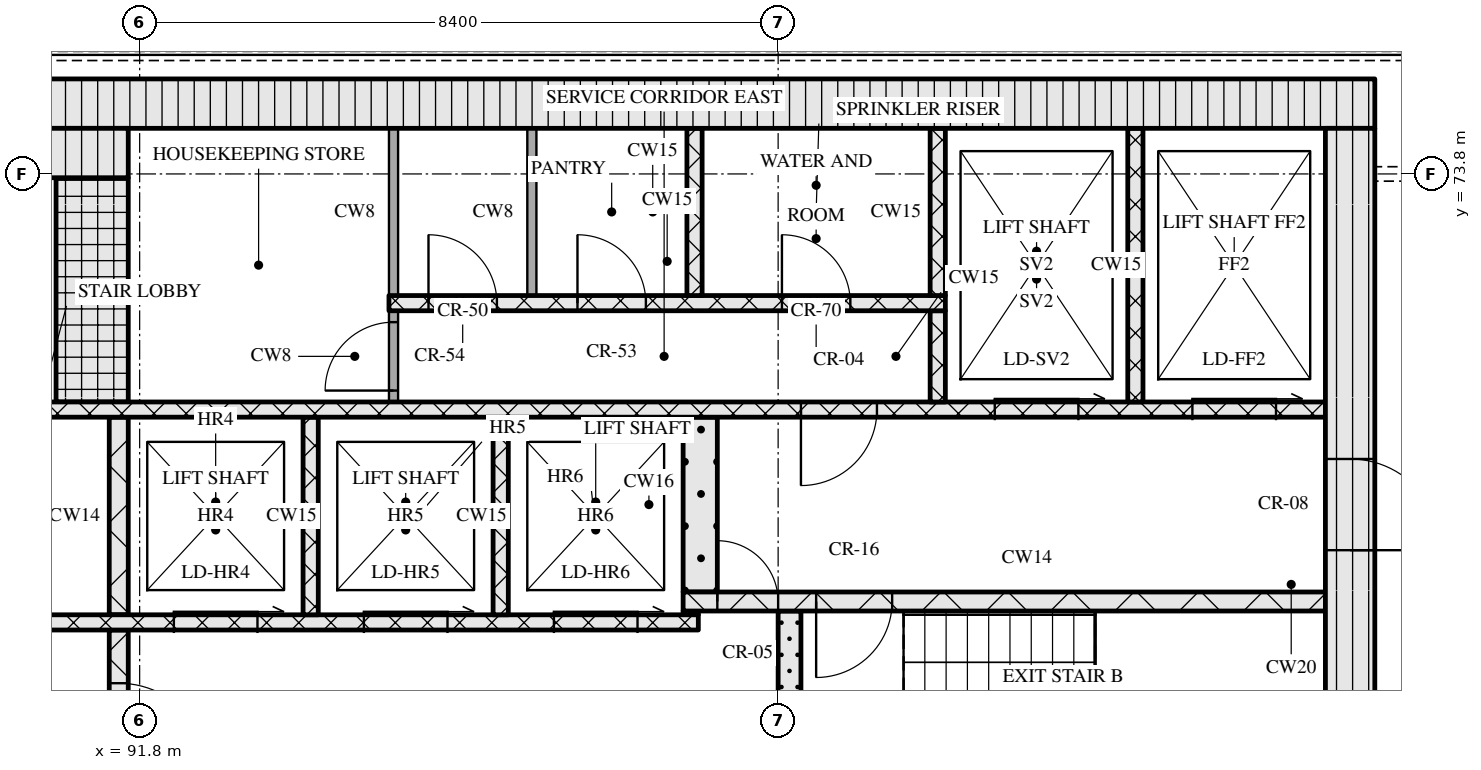
"""IFC4 building model, lengths in metres.
Left out: names, types, materials, properties, quantities, classifications, styles, units other than length and angle.
Written with IfcOpenShell. Run it as: python <this file> out.ifc"""

import sys

from ifc_helpers import new_model, si_unit, direction, frame, frame_2d, origin, place, context, subcontext, project, spatial, rectangle, extrude, element, fill, save


model = new_model("IFC4")
c1 = context("Model", 3, precision=1e-05, world=origin(), true_north=direction((0.0, 1.0)))
c2 = subcontext(c1, "Body", "Model", "MODEL_VIEW")
j1 = project(units=[si_unit("LENGTHUNIT", "METRE"), si_unit("PLANEANGLEUNIT", "RADIAN")], contexts=[c1])
p1 = place(None, origin())
s1 = spatial("IfcSite", under=j1, at=p1, CompositionType="ELEMENT")
p2 = place(p1, origin())
s2 = spatial("IfcBuilding", under=s1, at=p2, CompositionType="ELEMENT")
p3 = place(p2, frame((0.0, 0.0, 234.3)))
s3 = spatial("IfcBuildingStorey", under=s2, at=p3, CompositionType="ELEMENT", Elevation=234.3)
p4 = place(p3, frame((67.15, 74.725, 0.0), z_axis=(0.0, 0.0, 1.0), x_axis=(1.0, 0.0, 0.0)))
e1 = element("IfcWall", 1, at=p4, inside=s3, PredefinedType="SOLIDWALL", context=c2, shape_type="SweptSolid", body=[
    extrude(rectangle(XDim=40.9, YDim=0.65, at=frame_2d((20.45, 0.0))), origin(), (0.0, 0.0, 1.0), 3.32),
])
p5 = place(p3, frame((107.725, 62.4, 0.0), z_axis=(0.0, 0.0, 1.0), x_axis=(0.0, 1.0, 0.0)))
e2 = element("IfcWall", 2, at=p5, inside=s3, PredefinedType="SOLIDWALL", context=c2, shape_type="SweptSolid", body=[
    extrude(rectangle(XDim=12.0, YDim=0.65, at=frame_2d((6.0, 0.0))), origin(), (0.0, 0.0, 1.0), 3.32),
])
p6 = place(p5, frame((6.45, 0.0, 0.0)))
e3 = element("IfcOpeningElement", 3, at=p6, cuts=e2, PredefinedType="OPENING", context=c2, shape_type="SweptSolid", body=[
    extrude(rectangle(XDim=1.2, YDim=2.1, at=frame_2d((0.6, 1.05))), frame((0.0, 0.335, 0.0), z_axis=(0.0, -1.0, 0.0), x_axis=(1.0, 0.0, 0.0)), (0.0, 0.0, 1.0), 0.67),
])
p7 = place(p3, frame((91.525, 65.2, 0.0), z_axis=(0.0, 0.0, 1.0), x_axis=(0.0, 1.0, 0.0)))
e4 = element("IfcWall", 4, at=p7, inside=s3, PredefinedType="SOLIDWALL", context=c2, shape_type="SweptSolid", body=[
    extrude(rectangle(XDim=2.6, YDim=0.25, at=frame_2d((1.3, 0.0))), origin(), (0.0, 0.0, 1.0), 3.32),
])
p8 = place(p7, frame((0.7, 0.0, 0.0)))
e5 = element("IfcOpeningElement", 5, at=p8, cuts=e4, PredefinedType="OPENING", context=c2, shape_type="SweptSolid", body=[
    extrude(rectangle(XDim=1.2, YDim=2.1, at=frame_2d((0.6, 1.05))), frame((0.0, 0.135, 0.0), z_axis=(0.0, -1.0, 0.0), x_axis=(1.0, 0.0, 0.0)), (0.0, 0.0, 1.0), 0.27),
])
p9 = place(p3, frame((100.35, 65.2, 0.0), z_axis=(0.0, 0.0, 1.0), x_axis=(0.0, 1.0, 0.0)))
e6 = element("IfcWall", 6, at=p9, inside=s3, PredefinedType="SOLIDWALL", context=c2, shape_type="SweptSolid", body=[
    extrude(rectangle(XDim=2.85, YDim=0.3, at=frame_2d((1.425, 0.0))), origin(), (0.0, 0.0, 1.0), 3.32),
])
p10 = place(p3, frame((76.05, 67.9, 0.0), z_axis=(0.0, 0.0, 1.0), x_axis=(1.0, 0.0, 0.0)))
e7 = element("IfcWall", 7, at=p10, inside=s3, PredefinedType="SOLIDWALL", context=c2, shape_type="SweptSolid", body=[
    extrude(rectangle(XDim=23.1, YDim=0.2, at=frame_2d((11.55, 0.0))), origin(), (0.0, 0.0, 1.0), 3.32),
])
p11 = place(p10, frame((1.35, 0.0, 0.0)))
e8 = element("IfcOpeningElement", 8, at=p11, cuts=e7, PredefinedType="OPENING", context=c2, shape_type="SweptSolid", body=[
    extrude(rectangle(XDim=0.9, YDim=2.1, at=frame_2d((0.45, 1.05))), frame((0.0, 0.11, 0.0), z_axis=(0.0, -1.0, 0.0), x_axis=(1.0, 0.0, 0.0)), (0.0, 0.0, 1.0), 0.22),
])
p12 = place(p10, frame((5.06, 0.0, 0.0)))
e9 = element("IfcOpeningElement", 9, at=p12, cuts=e7, PredefinedType="OPENING", context=c2, shape_type="SweptSolid", body=[
    extrude(rectangle(XDim=0.9, YDim=2.1, at=frame_2d((0.45, 1.05))), frame((0.0, 0.11, 0.0), z_axis=(0.0, -1.0, 0.0), x_axis=(1.0, 0.0, 0.0)), (0.0, 0.0, 1.0), 0.22),
])
p13 = place(p10, frame((8.45, 0.0, 0.0)))
e10 = element("IfcOpeningElement", 10, at=p13, cuts=e7, PredefinedType="OPENING", context=c2, shape_type="SweptSolid", body=[
    extrude(rectangle(XDim=0.9, YDim=2.1, at=frame_2d((0.45, 1.05))), frame((0.0, 0.11, 0.0), z_axis=(0.0, -1.0, 0.0), x_axis=(1.0, 0.0, 0.0)), (0.0, 0.0, 1.0), 0.22),
])
p14 = place(p10, frame((10.91, 0.0, 0.0)))
e11 = element("IfcOpeningElement", 11, at=p14, cuts=e7, PredefinedType="OPENING", context=c2, shape_type="SweptSolid", body=[
    extrude(rectangle(XDim=0.9, YDim=2.1, at=frame_2d((0.45, 1.05))), frame((0.0, 0.11, 0.0), z_axis=(0.0, -1.0, 0.0), x_axis=(1.0, 0.0, 0.0)), (0.0, 0.0, 1.0), 0.22),
])
p15 = place(p10, frame((13.55, 0.0, 0.0)))
e12 = element("IfcOpeningElement", 12, at=p15, cuts=e7, PredefinedType="OPENING", context=c2, shape_type="SweptSolid", body=[
    extrude(rectangle(XDim=1.0, YDim=2.1, at=frame_2d((0.5, 1.05))), frame((0.0, 0.11, 0.0), z_axis=(0.0, -1.0, 0.0), x_axis=(1.0, 0.0, 0.0)), (0.0, 0.0, 1.0), 0.22),
])
p16 = place(p10, frame((16.2, 0.0, 0.0)))
e13 = element("IfcOpeningElement", 13, at=p16, cuts=e7, PredefinedType="OPENING", context=c2, shape_type="SweptSolid", body=[
    extrude(rectangle(XDim=1.1, YDim=2.1, at=frame_2d((0.55, 1.05))), frame((0.0, 0.11, 0.0), z_axis=(0.0, -1.0, 0.0), x_axis=(1.0, 0.0, 0.0)), (0.0, 0.0, 1.0), 0.22),
])
p17 = place(p10, frame((18.7, 0.0, 0.0)))
e14 = element("IfcOpeningElement", 14, at=p17, cuts=e7, PredefinedType="OPENING", context=c2, shape_type="SweptSolid", body=[
    extrude(rectangle(XDim=1.1, YDim=2.1, at=frame_2d((0.55, 1.05))), frame((0.0, 0.11, 0.0), z_axis=(0.0, -1.0, 0.0), x_axis=(1.0, 0.0, 0.0)), (0.0, 0.0, 1.0), 0.22),
])
p18 = place(p10, frame((21.2, 0.0, 0.0)))
e15 = element("IfcOpeningElement", 15, at=p18, cuts=e7, PredefinedType="OPENING", context=c2, shape_type="SweptSolid", body=[
    extrude(rectangle(XDim=1.1, YDim=2.1, at=frame_2d((0.55, 1.05))), frame((0.0, 0.11, 0.0), z_axis=(0.0, -1.0, 0.0), x_axis=(1.0, 0.0, 0.0)), (0.0, 0.0, 1.0), 0.22),
])
p19 = place(p3, frame((91.525, 68.0, 0.0), z_axis=(0.0, 0.0, 1.0), x_axis=(0.0, 1.0, 0.0)))
e16 = element("IfcWall", 16, at=p19, inside=s3, PredefinedType="SOLIDWALL", context=c2, shape_type="SweptSolid", body=[
    extrude(rectangle(XDim=2.6, YDim=0.25, at=frame_2d((1.3, 0.0))), origin(), (0.0, 0.0, 1.0), 3.32),
])
for number, where, z_axis, x_axis in (
    (17, (94.05, 68.0, 0.0), (0.0, 0.0, 1.0), (0.0, 1.0, 0.0)),
    (18, (96.55, 68.0, 0.0), (0.0, 0.0, 1.0), (0.0, 1.0, 0.0)),
):
    element("IfcWall", number, at=place(p3, frame(where, z_axis=z_axis, x_axis=x_axis)), inside=s3, PredefinedType="SOLIDWALL", context=c2, shape_type="SweptSolid", body=[
        extrude(rectangle(XDim=2.6, YDim=0.2, at=frame_2d((1.3, 0.0))), origin(), (0.0, 0.0, 1.0), 3.32),
    ])
p20 = place(p3, frame((98.95, 68.025, 0.0), z_axis=(0.0, 0.0, 1.0), x_axis=(1.0, 0.0, 0.0)))
e19 = element("IfcWall", 19, at=p20, inside=s3, PredefinedType="SOLIDWALL", context=c2, shape_type="SweptSolid", body=[
    extrude(rectangle(XDim=0.2, YDim=0.05, at=frame_2d((0.1, 0.0))), origin(), (0.0, 0.0, 1.0), 3.32),
])
p21 = place(p3, frame((98.95, 68.175, 0.0), z_axis=(0.0, 0.0, 1.0), x_axis=(1.0, 0.0, 0.0)))
e20 = element("IfcWall", 20, at=p21, inside=s3, PredefinedType="SOLIDWALL", context=c2, shape_type="SweptSolid", body=[
    extrude(rectangle(XDim=8.45, YDim=0.25, at=frame_2d((4.225, 0.0))), origin(), (0.0, 0.0, 1.0), 3.32),
])
p22 = place(p21, frame((0.45, 0.0, 0.0)))
e21 = element("IfcOpeningElement", 21, at=p22, cuts=e20, PredefinedType="OPENING", context=c2, shape_type="SweptSolid", body=[
    extrude(rectangle(XDim=0.8, YDim=2.1, at=frame_2d((0.4, 1.05))), frame((0.0, 0.135, 0.0), z_axis=(0.0, -1.0, 0.0), x_axis=(1.0, 0.0, 0.0)), (0.0, 0.0, 1.0), 0.27),
])
p23 = place(p21, frame((1.75, 0.0, 0.0)))
e22 = element("IfcOpeningElement", 22, at=p23, cuts=e20, PredefinedType="OPENING", context=c2, shape_type="SweptSolid", body=[
    extrude(rectangle(XDim=1.0, YDim=2.1, at=frame_2d((0.5, 1.05))), frame((0.0, 0.135, 0.0), z_axis=(0.0, -1.0, 0.0), x_axis=(1.0, 0.0, 0.0)), (0.0, 0.0, 1.0), 0.27),
])
p24 = place(p3, frame((99.175, 68.3, 0.0), z_axis=(0.0, 0.0, 1.0), x_axis=(0.0, 1.0, 0.0)))
e23 = element("IfcWall", 23, at=p24, inside=s3, PredefinedType="SOLIDWALL", context=c2, shape_type="SweptSolid", body=[
    extrude(rectangle(XDim=2.3, YDim=0.45, at=frame_2d((1.15, 0.0))), origin(), (0.0, 0.0, 1.0), 3.32),
])
p25 = place(p3, frame((67.8, 70.7, 0.0), z_axis=(0.0, 0.0, 1.0), x_axis=(1.0, 0.0, 0.0)))
e24 = element("IfcWall", 24, at=p25, inside=s3, PredefinedType="SOLIDWALL", context=c2, shape_type="SweptSolid", body=[
    extrude(rectangle(XDim=39.6, YDim=0.2, at=frame_2d((19.8, 0.0))), origin(), (0.0, 0.0, 1.0), 3.32),
])
p26 = place(p25, frame((0.65, 0.0, 0.0)))
e25 = element("IfcOpeningElement", 25, at=p26, cuts=e24, PredefinedType="OPENING", context=c2, shape_type="SweptSolid", body=[
    extrude(rectangle(XDim=1.1, YDim=2.1, at=frame_2d((0.55, 1.05))), frame((0.0, 0.11, 0.0), z_axis=(0.0, -1.0, 0.0), x_axis=(1.0, 0.0, 0.0)), (0.0, 0.0, 1.0), 0.22),
])
p27 = place(p25, frame((3.25, 0.0, 0.0)))
e26 = element("IfcOpeningElement", 26, at=p27, cuts=e24, PredefinedType="OPENING", context=c2, shape_type="SweptSolid", body=[
    extrude(rectangle(XDim=1.1, YDim=2.1, at=frame_2d((0.55, 1.05))), frame((0.0, 0.11, 0.0), z_axis=(0.0, -1.0, 0.0), x_axis=(1.0, 0.0, 0.0)), (0.0, 0.0, 1.0), 0.22),
])
p28 = place(p25, frame((5.9, 0.0, 0.0)))
e27 = element("IfcOpeningElement", 27, at=p28, cuts=e24, PredefinedType="OPENING", context=c2, shape_type="SweptSolid", body=[
    extrude(rectangle(XDim=1.0, YDim=2.1, at=frame_2d((0.5, 1.05))), frame((0.0, 0.11, 0.0), z_axis=(0.0, -1.0, 0.0), x_axis=(1.0, 0.0, 0.0)), (0.0, 0.0, 1.0), 0.22),
])
p29 = place(p25, frame((21.7, 0.0, 0.0)))
e28 = element("IfcOpeningElement", 28, at=p29, cuts=e24, PredefinedType="OPENING", context=c2, shape_type="SweptSolid", body=[
    extrude(rectangle(XDim=1.0, YDim=2.1, at=frame_2d((0.5, 1.05))), frame((0.0, 0.11, 0.0), z_axis=(0.0, -1.0, 0.0), x_axis=(1.0, 0.0, 0.0)), (0.0, 0.0, 1.0), 0.22),
])
p30 = place(p25, frame((32.7, 0.0, 0.0)))
e29 = element("IfcOpeningElement", 29, at=p30, cuts=e24, PredefinedType="OPENING", context=c2, shape_type="SweptSolid", body=[
    extrude(rectangle(XDim=1.0, YDim=2.1, at=frame_2d((0.5, 1.05))), frame((0.0, 0.11, 0.0), z_axis=(0.0, -1.0, 0.0), x_axis=(1.0, 0.0, 0.0)), (0.0, 0.0, 1.0), 0.22),
])
p31 = place(p25, frame((35.25, 0.0, 0.0)))
e30 = element("IfcOpeningElement", 30, at=p31, cuts=e24, PredefinedType="OPENING", context=c2, shape_type="SweptSolid", body=[
    extrude(rectangle(XDim=1.1, YDim=2.1, at=frame_2d((0.55, 1.05))), frame((0.0, 0.11, 0.0), z_axis=(0.0, -1.0, 0.0), x_axis=(1.0, 0.0, 0.0)), (0.0, 0.0, 1.0), 0.22),
])
p32 = place(p25, frame((37.85, 0.0, 0.0)))
e31 = element("IfcOpeningElement", 31, at=p32, cuts=e24, PredefinedType="OPENING", context=c2, shape_type="SweptSolid", body=[
    extrude(rectangle(XDim=1.1, YDim=2.1, at=frame_2d((0.55, 1.05))), frame((0.0, 0.11, 0.0), z_axis=(0.0, -1.0, 0.0), x_axis=(1.0, 0.0, 0.0)), (0.0, 0.0, 1.0), 0.22),
])
p33 = place(p3, frame((91.175, 70.8, 0.0), z_axis=(0.0, 0.0, 1.0), x_axis=(0.0, 1.0, 0.0)))
e32 = element("IfcWall", 32, at=p33, inside=s3, PredefinedType="SOLIDWALL", context=c2, shape_type="SweptSolid", body=[
    extrude(rectangle(XDim=2.95, YDim=0.95, at=frame_2d((1.475, 0.0))), origin(), (0.0, 0.0, 1.0), 3.32),
])
p34 = place(p3, frame((95.14, 70.8, 0.0), z_axis=(0.0, 0.0, 1.0), x_axis=(0.0, 1.0, 0.0)))
e33 = element("IfcWall", 33, at=p34, inside=s3, PredefinedType="PARTITIONING", context=c2, shape_type="SweptSolid", body=[
    extrude(rectangle(XDim=1.2, YDim=0.12, at=frame_2d((0.6, 0.0))), origin(), (0.0, 0.0, 1.0), 3.32),
])
p35 = place(p34, frame((0.15, 0.0, 0.0)))
e34 = element("IfcOpeningElement", 34, at=p35, cuts=e33, PredefinedType="OPENING", context=c2, shape_type="SweptSolid", body=[
    extrude(rectangle(XDim=0.9, YDim=2.1, at=frame_2d((0.45, 1.05))), frame((0.0, 0.07, 0.0), z_axis=(0.0, -1.0, 0.0), x_axis=(1.0, 0.0, 0.0)), (0.0, 0.0, 1.0), 0.14),
])
p36 = place(p3, frame((102.3, 70.8, 0.0), z_axis=(0.0, 0.0, 1.0), x_axis=(0.0, 1.0, 0.0)))
e35 = element("IfcWall", 35, at=p36, inside=s3, PredefinedType="SOLIDWALL", context=c2, shape_type="SweptSolid", body=[
    extrude(rectangle(XDim=1.2, YDim=0.2, at=frame_2d((0.6, 0.0))), origin(), (0.0, 0.0, 1.0), 3.32),
])
p37 = place(p3, frame((104.9, 70.8, 0.0), z_axis=(0.0, 0.0, 1.0), x_axis=(0.0, 1.0, 0.0)))
e36 = element("IfcWall", 36, at=p37, inside=s3, PredefinedType="SOLIDWALL", context=c2, shape_type="SweptSolid", body=[
    extrude(rectangle(XDim=3.6, YDim=0.2, at=frame_2d((1.8, 0.0))), origin(), (0.0, 0.0, 1.0), 3.32),
])
p38 = place(p3, frame((95.08, 72.1, 0.0), z_axis=(0.0, 0.0, 1.0), x_axis=(1.0, 0.0, 0.0)))
e37 = element("IfcWall", 37, at=p38, inside=s3, PredefinedType="SOLIDWALL", context=c2, shape_type="SweptSolid", body=[
    extrude(rectangle(XDim=7.32, YDim=0.2, at=frame_2d((3.66, 0.0))), origin(), (0.0, 0.0, 1.0), 3.32),
])
p39 = place(p38, frame((0.52, 0.0, 0.0)))
e38 = element("IfcOpeningElement", 38, at=p39, cuts=e37, PredefinedType="OPENING", context=c2, shape_type="SweptSolid", body=[
    extrude(rectangle(XDim=0.9, YDim=2.1, at=frame_2d((0.45, 1.05))), frame((0.0, 0.11, 0.0), z_axis=(0.0, -1.0, 0.0), x_axis=(1.0, 0.0, 0.0)), (0.0, 0.0, 1.0), 0.22),
])
p40 = place(p38, frame((2.48, 0.0, 0.0)))
e39 = element("IfcOpeningElement", 39, at=p40, cuts=e37, PredefinedType="OPENING", context=c2, shape_type="SweptSolid", body=[
    extrude(rectangle(XDim=0.9, YDim=2.1, at=frame_2d((0.45, 1.05))), frame((0.0, 0.11, 0.0), z_axis=(0.0, -1.0, 0.0), x_axis=(1.0, 0.0, 0.0)), (0.0, 0.0, 1.0), 0.22),
])
p41 = place(p38, frame((5.17, 0.0, 0.0)))
e40 = element("IfcOpeningElement", 40, at=p41, cuts=e37, PredefinedType="OPENING", context=c2, shape_type="SweptSolid", body=[
    extrude(rectangle(XDim=0.9, YDim=2.1, at=frame_2d((0.45, 1.05))), frame((0.0, 0.11, 0.0), z_axis=(0.0, -1.0, 0.0), x_axis=(1.0, 0.0, 0.0)), (0.0, 0.0, 1.0), 0.22),
])
for number, where, z_axis, x_axis in (
    (41, (95.14, 72.2, 0.0), (0.0, 0.0, 1.0), (0.0, 1.0, 0.0)),
    (42, (96.96, 72.2, 0.0), (0.0, 0.0, 1.0), (0.0, 1.0, 0.0)),
):
    element("IfcWall", number, at=place(p3, frame(where, z_axis=z_axis, x_axis=x_axis)), inside=s3, PredefinedType="PARTITIONING", context=c2, shape_type="SweptSolid", body=[
        extrude(rectangle(XDim=2.2, YDim=0.12, at=frame_2d((1.1, 0.0))), origin(), (0.0, 0.0, 1.0), 3.32),
    ])
for number, where, z_axis, x_axis in (
    (43, (99.1, 72.2, 0.0), (0.0, 0.0, 1.0), (0.0, 1.0, 0.0)),
    (44, (102.3, 72.2, 0.0), (0.0, 0.0, 1.0), (0.0, 1.0, 0.0)),
):
    element("IfcWall", number, at=place(p3, frame(where, z_axis=z_axis, x_axis=x_axis)), inside=s3, PredefinedType="SOLIDWALL", context=c2, shape_type="SweptSolid", body=[
        extrude(rectangle(XDim=2.2, YDim=0.2, at=frame_2d((1.1, 0.0))), origin(), (0.0, 0.0, 1.0), 3.32),
    ])
p42 = place(p3, frame((83.55, 74.075, 0.0), z_axis=(0.0, 0.0, 1.0), x_axis=(1.0, 0.0, 0.0)))
e45 = element("IfcWall", 45, at=p42, inside=s3, PredefinedType="SOLIDWALL", context=c2, shape_type="SweptSolid", body=[
    extrude(rectangle(XDim=8.1, YDim=0.65, at=frame_2d((4.05, 0.0))), origin(), (0.0, 0.0, 1.0), 3.32),
])
p43 = place(p8, origin())
e46 = element("IfcDoor", 46, at=p43, inside=s3, OperationType="SINGLE_SWING_RIGHT", PredefinedType="DOOR", context=c2, shape_type="SweptSolid", body=[
    extrude(rectangle(XDim=1.2, YDim=2.1, at=frame_2d((0.6, 1.05))), frame((0.0, 0.025, 0.0), z_axis=(0.0, -1.0, 0.0), x_axis=(1.0, 0.0, 0.0)), (0.0, 0.0, 1.0), 0.05),
])
fill(e5, e46)
p44 = place(p16, origin())
e47 = element("IfcDoor", 47, at=p44, inside=s3, OperationType="SLIDING_TO_RIGHT", PredefinedType="DOOR", context=c2, shape_type="SweptSolid", body=[
    extrude(rectangle(XDim=1.1, YDim=2.1, at=frame_2d((0.55, 1.05))), frame((0.0, 0.025, 0.0), z_axis=(0.0, -1.0, 0.0), x_axis=(1.0, 0.0, 0.0)), (0.0, 0.0, 1.0), 0.05),
])
fill(e13, e47)
p45 = place(p17, origin())
e48 = element("IfcDoor", 48, at=p45, inside=s3, OperationType="SLIDING_TO_RIGHT", PredefinedType="DOOR", context=c2, shape_type="SweptSolid", body=[
    extrude(rectangle(XDim=1.1, YDim=2.1, at=frame_2d((0.55, 1.05))), frame((0.0, 0.025, 0.0), z_axis=(0.0, -1.0, 0.0), x_axis=(1.0, 0.0, 0.0)), (0.0, 0.0, 1.0), 0.05),
])
fill(e14, e48)
p46 = place(p18, origin())
e49 = element("IfcDoor", 49, at=p46, inside=s3, OperationType="SLIDING_TO_RIGHT", PredefinedType="DOOR", context=c2, shape_type="SweptSolid", body=[
    extrude(rectangle(XDim=1.1, YDim=2.1, at=frame_2d((0.55, 1.05))), frame((0.0, 0.025, 0.0), z_axis=(0.0, -1.0, 0.0), x_axis=(1.0, 0.0, 0.0)), (0.0, 0.0, 1.0), 0.05),
])
fill(e15, e49)
p47 = place(p22, origin())
e50 = element("IfcDoor", 50, at=p47, inside=s3, OperationType="SINGLE_SWING_LEFT", PredefinedType="DOOR", context=c2, shape_type="SweptSolid", body=[
    extrude(rectangle(XDim=0.8, YDim=2.1, at=frame_2d((0.4, 1.05))), frame((0.0, 0.025, 0.0), z_axis=(0.0, -1.0, 0.0), x_axis=(1.0, 0.0, 0.0)), (0.0, 0.0, 1.0), 0.05),
])
fill(e21, e50)
p48 = place(p23, origin())
e51 = element("IfcDoor", 51, at=p48, inside=s3, OperationType="SINGLE_SWING_RIGHT", PredefinedType="DOOR", context=c2, shape_type="SweptSolid", body=[
    extrude(rectangle(XDim=1.0, YDim=2.1, at=frame_2d((0.5, 1.05))), frame((0.0, 0.025, 0.0), z_axis=(0.0, -1.0, 0.0), x_axis=(1.0, 0.0, 0.0)), (0.0, 0.0, 1.0), 0.05),
])
fill(e22, e51)
p49 = place(p6, origin())
e52 = element("IfcDoor", 52, at=p49, inside=s3, OperationType="SINGLE_SWING_RIGHT", PredefinedType="DOOR", context=c2, shape_type="SweptSolid", body=[
    extrude(rectangle(XDim=1.2, YDim=2.1, at=frame_2d((0.6, 1.05))), frame((0.0, 0.025, 0.0), z_axis=(0.0, -1.0, 0.0), x_axis=(1.0, 0.0, 0.0)), (0.0, 0.0, 1.0), 0.05),
])
fill(e3, e52)
p50 = place(p30, origin())
e53 = element("IfcDoor", 53, at=p50, inside=s3, OperationType="SINGLE_SWING_RIGHT", PredefinedType="DOOR", context=c2, shape_type="SweptSolid", body=[
    extrude(rectangle(XDim=1.0, YDim=2.1, at=frame_2d((0.5, 1.05))), frame((0.0, 0.025, 0.0), z_axis=(0.0, -1.0, 0.0), x_axis=(1.0, 0.0, 0.0)), (0.0, 0.0, 1.0), 0.05),
])
fill(e29, e53)
p51 = place(p31, origin())
e54 = element("IfcDoor", 54, at=p51, inside=s3, OperationType="SLIDING_TO_RIGHT", PredefinedType="DOOR", context=c2, shape_type="SweptSolid", body=[
    extrude(rectangle(XDim=1.1, YDim=2.1, at=frame_2d((0.55, 1.05))), frame((0.0, 0.025, 0.0), z_axis=(0.0, -1.0, 0.0), x_axis=(1.0, 0.0, 0.0)), (0.0, 0.0, 1.0), 0.05),
])
fill(e30, e54)
p52 = place(p32, origin())
e55 = element("IfcDoor", 55, at=p52, inside=s3, OperationType="SLIDING_TO_RIGHT", PredefinedType="DOOR", context=c2, shape_type="SweptSolid", body=[
    extrude(rectangle(XDim=1.1, YDim=2.1, at=frame_2d((0.55, 1.05))), frame((0.0, 0.025, 0.0), z_axis=(0.0, -1.0, 0.0), x_axis=(1.0, 0.0, 0.0)), (0.0, 0.0, 1.0), 0.05),
])
fill(e31, e55)
p53 = place(p35, origin())
e56 = element("IfcDoor", 56, at=p53, inside=s3, OperationType="SINGLE_SWING_LEFT", PredefinedType="DOOR", context=c2, shape_type="SweptSolid", body=[
    extrude(rectangle(XDim=0.9, YDim=2.1, at=frame_2d((0.45, 1.05))), frame((0.0, 0.025, 0.0), z_axis=(0.0, -1.0, 0.0), x_axis=(1.0, 0.0, 0.0)), (0.0, 0.0, 1.0), 0.05),
])
fill(e34, e56)
p54 = place(p39, origin())
e57 = element("IfcDoor", 57, at=p54, inside=s3, OperationType="SINGLE_SWING_LEFT", PredefinedType="DOOR", context=c2, shape_type="SweptSolid", body=[
    extrude(rectangle(XDim=0.9, YDim=2.1, at=frame_2d((0.45, 1.05))), frame((0.0, 0.025, 0.0), z_axis=(0.0, -1.0, 0.0), x_axis=(1.0, 0.0, 0.0)), (0.0, 0.0, 1.0), 0.05),
])
fill(e38, e57)
p55 = place(p40, origin())
e58 = element("IfcDoor", 58, at=p55, inside=s3, OperationType="SINGLE_SWING_LEFT", PredefinedType="DOOR", context=c2, shape_type="SweptSolid", body=[
    extrude(rectangle(XDim=0.9, YDim=2.1, at=frame_2d((0.45, 1.05))), frame((0.0, 0.025, 0.0), z_axis=(0.0, -1.0, 0.0), x_axis=(1.0, 0.0, 0.0)), (0.0, 0.0, 1.0), 0.05),
])
fill(e39, e58)
p56 = place(p41, origin())
e59 = element("IfcDoor", 59, at=p56, inside=s3, OperationType="SINGLE_SWING_LEFT", PredefinedType="DOOR", context=c2, shape_type="SweptSolid", body=[
    extrude(rectangle(XDim=0.9, YDim=2.1, at=frame_2d((0.45, 1.05))), frame((0.0, 0.025, 0.0), z_axis=(0.0, -1.0, 0.0), x_axis=(1.0, 0.0, 0.0)), (0.0, 0.0, 1.0), 0.05),
])
fill(e40, e59)
save(model, sys.argv[1])
